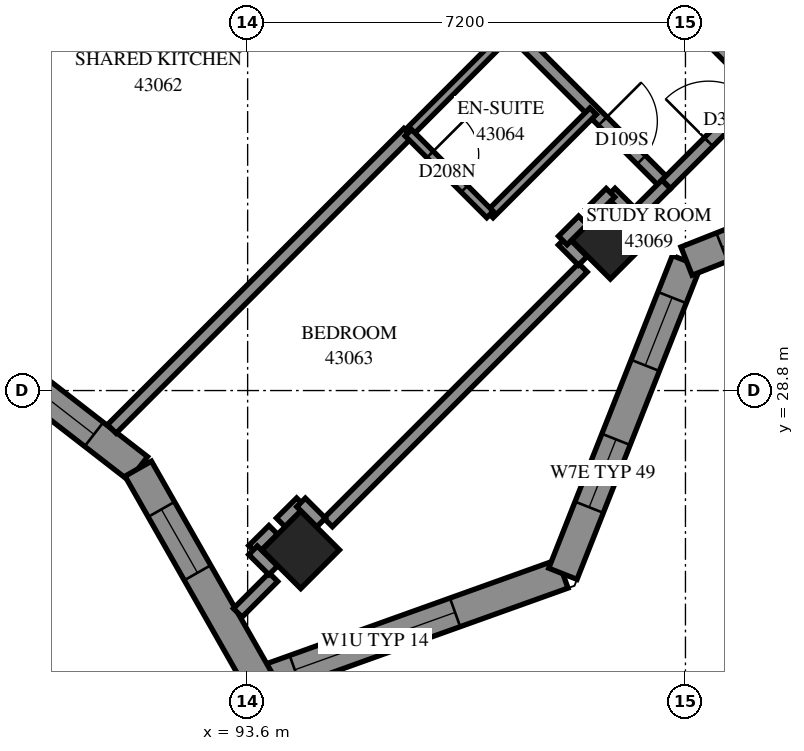
"""IFC4 building model, lengths in metres.
Left out: names, types, materials, properties, quantities, classifications, styles, units other than length and angle.
Written with IfcOpenShell. Run it as: python <this file> out.ifc"""

import sys

from ifc_helpers import new_model, si_unit, direction, frame, frame_2d, origin, origin_2d, place, context, subcontext, project, spatial, polyline, rectangle, outline, extrude, element, fill, save


model = new_model("IFC4")
c1 = context("Model", 3, precision=1e-05, world=origin(), true_north=direction((0.0, 1.0)))
c2 = subcontext(c1, "Body", "Model", "MODEL_VIEW")
j1 = project(units=[si_unit("LENGTHUNIT", "METRE"), si_unit("PLANEANGLEUNIT", "RADIAN")], contexts=[c1])
p1 = place(None, origin())
s1 = spatial("IfcSite", under=j1, at=p1, CompositionType="ELEMENT")
p2 = place(p1, origin())
s2 = spatial("IfcBuilding", under=s1, at=p2, CompositionType="ELEMENT")
p3 = place(p2, frame((0.0, 0.0, 159.2)))
s3 = spatial("IfcBuildingStorey", under=s2, at=p3, CompositionType="ELEMENT", Elevation=159.2)
for number, where, z_axis, x_axis in (
    (1, (99.565, 31.271, 0.0), (0.0, 0.0, 1.0), (0.707, -0.707, 0.0)),
    (2, (94.474, 26.18, 0.0), (0.0, 0.0, 1.0), (0.707, -0.707, 0.0)),
):
    element("IfcColumn", number, at=place(p3, frame(where, z_axis=z_axis, x_axis=x_axis)), inside=s3, PredefinedType="COLUMN", context=c2, shape_type="SweptSolid", body=[
        extrude(rectangle(XDim=0.9, YDim=0.9, at=origin_2d()), origin(), (0.0, 0.0, 1.0), 3.1),
    ])
p4 = place(p3, frame((93.801, 24.002, 0.0), z_axis=(0.0, 0.0, 1.0), x_axis=(0.9414496388, 0.3371536411, 0.0)))
e3 = element("IfcWall", 3, at=p4, inside=s3, PredefinedType="SOLIDWALL", context=c2, shape_type="SweptSolid", body=[
    extrude(outline(polyline([(-0.21, -0.25), (5.407, -0.25), (5.18, 0.25), (0.21, 0.25), (-0.21, -0.25)])), origin(), (0.0, 0.0, 1.0), 3.1),
])
p5 = place(p4, frame((0.61, 0.0, 0.45)))
e4 = element("IfcOpeningElement", 4, at=p5, cuts=e3, PredefinedType="OPENING", context=c2, shape_type="SweptSolid", body=[
    extrude(rectangle(XDim=2.8, YDim=2.5, at=frame_2d((1.4, 1.25))), frame((0.0, 0.26, 0.0), z_axis=(0.0, -1.0, 0.0), x_axis=(1.0, 0.0, 0.0)), (0.0, 0.0, 1.0), 0.52),
])
p6 = place(p3, frame((98.784, 25.787, 0.0), z_axis=(0.0, 0.0, 1.0), x_axis=(0.3677363656, 0.9299300863, 0.0)))
e5 = element("IfcWall", 5, at=p6, inside=s3, PredefinedType="SOLIDWALL", context=c2, shape_type="SweptSolid", body=[
    extrude(outline(polyline([(-0.113, -0.25), (5.421, -0.25), (5.638, 0.25), (0.113, 0.25), (-0.113, -0.25)])), origin(), (0.0, 0.0, 1.0), 3.1),
])
p7 = place(p6, frame((1.177, 0.0, 0.45)))
e6 = element("IfcOpeningElement", 6, at=p7, cuts=e5, PredefinedType="OPENING", context=c2, shape_type="SweptSolid", body=[
    extrude(rectangle(XDim=1.2, YDim=2.5, at=frame_2d((0.6, 1.25))), frame((0.0, 0.26, 0.0), z_axis=(0.0, -1.0, 0.0), x_axis=(1.0, 0.0, 0.0)), (0.0, 0.0, 1.0), 0.52),
])
p8 = place(p6, frame((3.685, 0.0, 0.45)))
e7 = element("IfcOpeningElement", 7, at=p8, cuts=e5, PredefinedType="OPENING", context=c2, shape_type="SweptSolid", body=[
    extrude(rectangle(XDim=1.2, YDim=2.5, at=frame_2d((0.6, 1.25))), frame((0.0, 0.26, 0.0), z_axis=(0.0, -1.0, 0.0), x_axis=(1.0, 0.0, 0.0)), (0.0, 0.0, 1.0), 0.52),
])
p9 = place(p3, frame((100.817, 30.929, 0.0), z_axis=(0.0, 0.0, 1.0), x_axis=(0.9299300863, 0.3677363656, 0.0)))
e8 = element("IfcWall", 8, at=p9, inside=s3, PredefinedType="SOLIDWALL", context=c2, shape_type="SweptSolid", body=[
    extrude(outline(polyline([(0.108, -0.25), (5.642, -0.25), (5.416, 0.25), (-0.108, 0.25), (0.108, -0.25)])), origin(), (0.0, 0.0, 1.0), 3.1),
])
p10 = place(p9, frame((0.626, 0.0, 0.45)))
e9 = element("IfcOpeningElement", 9, at=p10, cuts=e8, PredefinedType="OPENING", context=c2, shape_type="SweptSolid", body=[
    extrude(rectangle(XDim=2.8, YDim=2.5, at=frame_2d((1.4, 1.25))), frame((0.0, 0.26, 0.0), z_axis=(0.0, -1.0, 0.0), x_axis=(1.0, 0.0, 0.0)), (0.0, 0.0, 1.0), 0.52),
])
p11 = place(p3, frame((88.559, 30.029, 0.0), z_axis=(0.0, 0.0, 1.0), x_axis=(0.7901665614, -0.6128921644, 0.0)))
e10 = element("IfcWall", 10, at=p11, inside=s3, PredefinedType="SOLIDWALL", context=c2, shape_type="SweptSolid", body=[
    extrude(outline(polyline([(-0.032, -0.25), (4.053, -0.25), (4.152, 0.25), (0.032, 0.25), (-0.032, -0.25)])), origin(), (0.0, 0.0, 1.0), 3.1),
])
p12 = place(p11, frame((0.381, 0.0, 0.45)))
e11 = element("IfcOpeningElement", 11, at=p12, cuts=e10, PredefinedType="OPENING", context=c2, shape_type="SweptSolid", body=[
    extrude(rectangle(XDim=2.8, YDim=2.5, at=frame_2d((1.4, 1.25))), frame((0.0, 0.26, 0.0), z_axis=(0.0, -1.0, 0.0), x_axis=(1.0, 0.0, 0.0)), (0.0, 0.0, 1.0), 0.52),
])
p13 = place(p3, frame((91.801, 27.515, 0.0), z_axis=(0.0, 0.0, 1.0), x_axis=(0.4947688164, -0.8690246362, 0.0)))
e12 = element("IfcWall", 12, at=p13, inside=s3, PredefinedType="SOLIDWALL", context=c2, shape_type="SweptSolid", body=[
    extrude(outline(polyline([(0.05, -0.25), (4.252, -0.25), (3.832, 0.25), (-0.05, 0.25), (0.05, -0.25)])), origin(), (0.0, 0.0, 1.0), 3.1),
])
p14 = place(p13, frame((0.769, 0.0, 0.45)))
e13 = element("IfcOpeningElement", 13, at=p14, cuts=e12, PredefinedType="OPENING", context=c2, shape_type="SweptSolid", body=[
    extrude(rectangle(XDim=1.2, YDim=2.5, at=frame_2d((0.6, 1.25))), frame((0.0, 0.26, 0.0), z_axis=(0.0, -1.0, 0.0), x_axis=(1.0, 0.0, 0.0)), (0.0, 0.0, 1.0), 0.52),
])
p15 = place(p3, frame((92.209, 40.459, 0.0), z_axis=(0.0, 0.0, 1.0), x_axis=(0.7071067812, -0.7071067812, 0.0)))
e14 = element("IfcWall", 14, at=p15, inside=s3, PredefinedType="PARTITIONING", context=c2, shape_type="SweptSolid", body=[
    extrude(rectangle(XDim=11.698, YDim=0.2, at=frame_2d((5.849, 0.0))), origin(), (0.0, 0.0, 1.0), 3.1),
])
p16 = place(p15, frame((2.931, 0.0, 0.0)))
e15 = element("IfcOpeningElement", 15, at=p16, cuts=e14, PredefinedType="OPENING", context=c2, shape_type="SweptSolid", body=[
    extrude(rectangle(XDim=1.0, YDim=2.1, at=frame_2d((0.5, 1.05))), frame((0.0, 0.11, 0.0), z_axis=(0.0, -1.0, 0.0), x_axis=(1.0, 0.0, 0.0)), (0.0, 0.0, 1.0), 0.22),
])
p17 = place(p15, frame((10.223, 0.0, 0.0)))
e16 = element("IfcOpeningElement", 16, at=p17, cuts=e14, PredefinedType="OPENING", context=c2, shape_type="SweptSolid", body=[
    extrude(rectangle(XDim=0.9, YDim=2.1, at=frame_2d((0.45, 1.05))), frame((0.0, 0.11, 0.0), z_axis=(0.0, -1.0, 0.0), x_axis=(1.0, 0.0, 0.0)), (0.0, 0.0, 1.0), 0.22),
])
p18 = place(p3, frame((91.366, 28.168, 0.0), z_axis=(0.0, 0.0, 1.0), x_axis=(0.7072591319, 0.7069543977, 0.0)))
e17 = element("IfcWall", 17, at=p18, inside=s3, PredefinedType="PARTITIONING", context=c2, shape_type="SweptSolid", body=[
    extrude(rectangle(XDim=6.891, YDim=0.2, at=frame_2d((3.446, 0.0))), origin(), (0.0, 0.0, 1.0), 3.1),
])
p19 = place(p3, frame((94.923, 26.631, 0.0), z_axis=(0.0, 0.0, 1.0), x_axis=(0.7071067812, 0.7071067812, 0.0)))
e18 = element("IfcWall", 18, at=p19, inside=s3, PredefinedType="PARTITIONING", context=c2, shape_type="SweptSolid", body=[
    extrude(rectangle(XDim=5.926, YDim=0.2, at=frame_2d((2.963, 0.0))), origin(), (0.0, 0.0, 1.0), 2.6),
])
p20 = place(p3, frame((98.295, 37.497, 0.0), z_axis=(0.0, 0.0, 1.0), x_axis=(0.7071067812, -0.7071067812, 0.0)))
e19 = element("IfcWall", 19, at=p20, inside=s3, PredefinedType="PARTITIONING", context=c2, shape_type="SweptSolid", body=[
    extrude(rectangle(XDim=5.301, YDim=0.2, at=frame_2d((2.65, 0.0))), origin(), (0.0, 0.0, 1.0), 3.1),
])
p21 = place(p20, frame((0.401, 0.0, 0.0)))
e20 = element("IfcOpeningElement", 20, at=p21, cuts=e19, PredefinedType="OPENING", context=c2, shape_type="SweptSolid", body=[
    extrude(rectangle(XDim=0.9, YDim=2.1, at=frame_2d((0.45, 1.05))), frame((0.0, 0.11, 0.0), z_axis=(0.0, -1.0, 0.0), x_axis=(1.0, 0.0, 0.0)), (0.0, 0.0, 1.0), 0.22),
])
p22 = place(p20, frame((2.1, 0.0, 0.0)))
e21 = element("IfcOpeningElement", 21, at=p22, cuts=e19, PredefinedType="OPENING", context=c2, shape_type="SweptSolid", body=[
    extrude(rectangle(XDim=0.9, YDim=2.1, at=frame_2d((0.45, 1.05))), frame((0.0, 0.11, 0.0), z_axis=(0.0, -1.0, 0.0), x_axis=(1.0, 0.0, 0.0)), (0.0, 0.0, 1.0), 0.22),
])
p23 = place(p3, frame((97.583, 31.695, 0.0), z_axis=(0.0, 0.0, 1.0), x_axis=(0.7071067812, 0.7071067812, 0.0)))
e22 = element("IfcWall", 22, at=p23, inside=s3, PredefinedType="PARTITIONING", context=c2, shape_type="SweptSolid", body=[
    extrude(rectangle(XDim=2.401, YDim=0.15, at=frame_2d((1.201, 0.0))), origin(), (0.0, 0.0, 1.0), 3.1),
])
p24 = place(p3, frame((96.245, 33.035, 0.0), z_axis=(0.0, 0.0, 1.0), x_axis=(0.706689978, 0.7075233388, 0.0)))
e23 = element("IfcWall", 23, at=p24, inside=s3, PredefinedType="PARTITIONING", context=c2, shape_type="SweptSolid", body=[
    extrude(rectangle(XDim=2.4, YDim=0.15, at=frame_2d((1.2, 0.0))), origin(), (0.0, 0.0, 1.0), 3.1),
])
p25 = place(p3, frame((100.483, 32.191, 0.0), z_axis=(0.0, 0.0, 1.0), x_axis=(0.7071067812, 0.7071067812, 0.0)))
e24 = element("IfcWall", 24, at=p25, inside=s3, PredefinedType="PARTITIONING", context=c2, shape_type="SweptSolid", body=[
    extrude(rectangle(XDim=2.198, YDim=0.2, at=frame_2d((1.099, 0.0))), origin(), (0.0, 0.0, 1.0), 2.6),
])
p26 = place(p25, frame((0.987, 0.0, 0.0)))
e25 = element("IfcOpeningElement", 25, at=p26, cuts=e24, PredefinedType="OPENING", context=c2, shape_type="SweptSolid", body=[
    extrude(rectangle(XDim=1.0, YDim=2.1, at=frame_2d((0.5, 1.05))), frame((0.0, 0.11, 0.0), z_axis=(0.0, -1.0, 0.0), x_axis=(1.0, 0.0, 0.0)), (0.0, 0.0, 1.0), 0.22),
])
p27 = place(p3, frame((96.243, 33.039, 0.0), z_axis=(0.0, 0.0, 1.0), x_axis=(0.7065800724, -0.7076330979, 0.0)))
e26 = element("IfcWall", 26, at=p27, inside=s3, PredefinedType="PARTITIONING", context=c2, shape_type="SweptSolid", body=[
    extrude(rectangle(XDim=1.899, YDim=0.15, at=frame_2d((0.95, 0.0))), origin(), (0.0, 0.0, 1.0), 3.1),
])
p28 = place(p27, frame((0.504, 0.0, 0.0)))
e27 = element("IfcOpeningElement", 27, at=p28, cuts=e26, PredefinedType="OPENING", context=c2, shape_type="SweptSolid", body=[
    extrude(rectangle(XDim=0.8, YDim=2.1, at=frame_2d((0.4, 1.05))), frame((0.0, 0.085, 0.0), z_axis=(0.0, -1.0, 0.0), x_axis=(1.0, 0.0, 0.0)), (0.0, 0.0, 1.0), 0.17),
])
p29 = place(p3, frame((93.438, 25.145, 0.0), z_axis=(0.0, 0.0, 1.0), x_axis=(0.707167148, 0.7070464092, 0.0)))
e28 = element("IfcWall", 28, at=p29, inside=s3, PredefinedType="PARTITIONING", context=c2, shape_type="SweptSolid", body=[
    extrude(rectangle(XDim=0.828, YDim=0.2, at=frame_2d((0.414, 0.0))), origin(), (0.0, 0.0, 1.0), 3.1),
])
p30 = place(p3, frame((100.013, 31.721, 0.0), z_axis=(0.0, 0.0, 1.0), x_axis=(0.7071067812, 0.7071067812, 0.0)))
e29 = element("IfcWall", 29, at=p30, inside=s3, PredefinedType="PARTITIONING", context=c2, shape_type="SweptSolid", body=[
    extrude(rectangle(XDim=0.665, YDim=0.2, at=frame_2d((0.332, 0.0))), origin(), (0.0, 0.0, 1.0), 2.6),
])
p31 = place(p3, frame((99.571, 32.055, 0.0), z_axis=(0.0, 0.0, 1.0), x_axis=(0.7092270271, -0.7049801586, 0.0)))
e30 = element("IfcWall", 30, at=p31, inside=s3, PredefinedType="PARTITIONING", context=c2, shape_type="SweptSolid", body=[
    extrude(rectangle(XDim=0.471, YDim=0.2, at=frame_2d((0.235, 0.0))), origin(), (0.0, 0.0, 1.0), 3.1),
])
p32 = place(p3, frame((99.235, 31.721, 0.0), z_axis=(0.0, 0.0, 1.0), x_axis=(0.7071067812, 0.7071067812, 0.0)))
e31 = element("IfcWall", 31, at=p32, inside=s3, PredefinedType="PARTITIONING", context=c2, shape_type="SweptSolid", body=[
    extrude(rectangle(XDim=0.469, YDim=0.2, at=frame_2d((0.235, 0.0))), origin(), (0.0, 0.0, 1.0), 3.1),
])
for number, where, z_axis, x_axis in (
    (32, (93.689, 26.179, 0.0), (0.0, 0.0, 1.0), (0.709, 0.705, 0.0)),
    (33, (93.689, 26.173, 0.0), (0.0, 0.0, 1.0), (0.709, -0.705, 0.0)),
    (34, (94.144, 26.632, 0.0), (0.0, 0.0, 1.0), (0.709, 0.705, 0.0)),
    (35, (98.781, 31.265, 0.0), (0.0, 0.0, 1.0), (0.705, -0.709, 0.0)),
):
    element("IfcWall", number, at=place(p3, frame(where, z_axis=z_axis, x_axis=x_axis)), inside=s3, PredefinedType="PARTITIONING", context=c2, shape_type="SweptSolid", body=[
        extrude(rectangle(XDim=0.468, YDim=0.2, at=frame_2d((0.234, 0.0))), origin(), (0.0, 0.0, 1.0), 3.1),
    ])
for number, where, z_axis, x_axis in (
    (36, (94.478, 26.96, 0.0), (0.0, 0.0, 1.0), (0.707, -0.707, 0.0)),
    (37, (98.783, 31.269, 0.0), (0.0, 0.0, 1.0), (0.707, 0.707, 0.0)),
):
    element("IfcWall", number, at=place(p3, frame(where, z_axis=z_axis, x_axis=x_axis)), inside=s3, PredefinedType="PARTITIONING", context=c2, shape_type="SweptSolid", body=[
        extrude(rectangle(XDim=0.467, YDim=0.2, at=frame_2d((0.233, 0.0))), origin(), (0.0, 0.0, 1.0), 3.1),
    ])
p33 = place(p5, origin())
e38 = element("IfcWindow", 38, at=p33, inside=s3, PartitioningType="SINGLE_PANEL", PredefinedType="WINDOW", context=c2, shape_type="SweptSolid", body=[
    extrude(rectangle(XDim=2.8, YDim=2.5, at=frame_2d((1.4, 1.25))), frame((0.0, 0.18, 0.0), z_axis=(0.0, -1.0, 0.0), x_axis=(1.0, 0.0, 0.0)), (0.0, 0.0, 1.0), 0.06),
])
fill(e4, e38)
p34 = place(p7, origin())
e39 = element("IfcWindow", 39, at=p34, inside=s3, PartitioningType="SINGLE_PANEL", PredefinedType="WINDOW", context=c2, shape_type="SweptSolid", body=[
    extrude(rectangle(XDim=1.2, YDim=2.5, at=frame_2d((0.6, 1.25))), frame((0.0, 0.18, 0.0), z_axis=(0.0, -1.0, 0.0), x_axis=(1.0, 0.0, 0.0)), (0.0, 0.0, 1.0), 0.06),
])
fill(e6, e39)
p35 = place(p8, origin())
e40 = element("IfcWindow", 40, at=p35, inside=s3, PartitioningType="SINGLE_PANEL", PredefinedType="WINDOW", context=c2, shape_type="SweptSolid", body=[
    extrude(rectangle(XDim=1.2, YDim=2.5, at=frame_2d((0.6, 1.25))), frame((0.0, 0.18, 0.0), z_axis=(0.0, -1.0, 0.0), x_axis=(1.0, 0.0, 0.0)), (0.0, 0.0, 1.0), 0.06),
])
fill(e7, e40)
p36 = place(p10, origin())
e41 = element("IfcWindow", 41, at=p36, inside=s3, PartitioningType="SINGLE_PANEL", PredefinedType="WINDOW", context=c2, shape_type="SweptSolid", body=[
    extrude(rectangle(XDim=2.8, YDim=2.5, at=frame_2d((1.4, 1.25))), frame((0.0, 0.18, 0.0), z_axis=(0.0, -1.0, 0.0), x_axis=(1.0, 0.0, 0.0)), (0.0, 0.0, 1.0), 0.06),
])
fill(e9, e41)
p37 = place(p12, origin())
e42 = element("IfcWindow", 42, at=p37, inside=s3, PartitioningType="SINGLE_PANEL", PredefinedType="WINDOW", context=c2, shape_type="SweptSolid", body=[
    extrude(rectangle(XDim=2.8, YDim=2.5, at=frame_2d((1.4, 1.25))), frame((0.0, 0.18, 0.0), z_axis=(0.0, -1.0, 0.0), x_axis=(1.0, 0.0, 0.0)), (0.0, 0.0, 1.0), 0.06),
])
fill(e11, e42)
p38 = place(p14, origin())
e43 = element("IfcWindow", 43, at=p38, inside=s3, PartitioningType="SINGLE_PANEL", PredefinedType="WINDOW", context=c2, shape_type="SweptSolid", body=[
    extrude(rectangle(XDim=1.2, YDim=2.5, at=frame_2d((0.6, 1.25))), frame((0.0, 0.18, 0.0), z_axis=(0.0, -1.0, 0.0), x_axis=(1.0, 0.0, 0.0)), (0.0, 0.0, 1.0), 0.06),
])
fill(e13, e43)
p39 = place(p17, origin())
e44 = element("IfcDoor", 44, at=p39, inside=s3, OperationType="SINGLE_SWING_LEFT", PredefinedType="DOOR", context=c2, shape_type="SweptSolid", body=[
    extrude(rectangle(XDim=0.9, YDim=2.1, at=frame_2d((0.45, 1.05))), frame((0.0, 0.025, 0.0), z_axis=(0.0, -1.0, 0.0), x_axis=(1.0, 0.0, 0.0)), (0.0, 0.0, 1.0), 0.05),
])
fill(e16, e44)
p40 = place(p28, origin())
e45 = element("IfcDoor", 45, at=p40, inside=s3, OperationType="SINGLE_SWING_RIGHT", PredefinedType="DOOR", context=c2, shape_type="SweptSolid", body=[
    extrude(rectangle(XDim=0.8, YDim=2.1, at=frame_2d((0.4, 1.05))), frame((0.0, 0.025, 0.0), z_axis=(0.0, -1.0, 0.0), x_axis=(1.0, 0.0, 0.0)), (0.0, 0.0, 1.0), 0.05),
])
fill(e27, e45)
p41 = place(p26, origin())
e46 = element("IfcDoor", 46, at=p41, inside=s3, OperationType="SINGLE_SWING_RIGHT", PredefinedType="DOOR", context=c2, shape_type="SweptSolid", body=[
    extrude(rectangle(XDim=1.0, YDim=2.1, at=frame_2d((0.5, 1.05))), frame((0.0, 0.025, 0.0), z_axis=(0.0, -1.0, 0.0), x_axis=(1.0, 0.0, 0.0)), (0.0, 0.0, 1.0), 0.05),
])
fill(e25, e46)
save(model, sys.argv[1])
